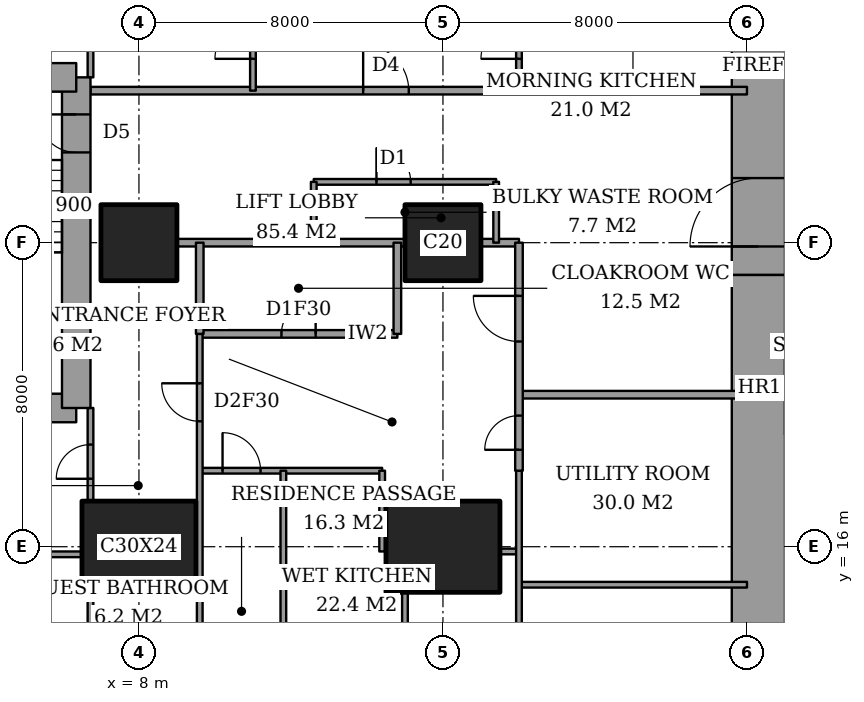
"""IFC4 building model, lengths in metres.
Left out: names, types, materials, properties, quantities, classifications, styles, units other than length and angle.
Written with IfcOpenShell. Run it as: python <this file> out.ifc"""

import sys

from ifc_helpers import new_model, si_unit, direction, frame, frame_2d, origin, origin_2d, place, context, subcontext, project, spatial, rectangle, extrude, element, fill, save


model = new_model("IFC4")
c1 = context("Model", 3, precision=1e-05, world=origin(), true_north=direction((0.0, 1.0)))
c2 = subcontext(c1, "Body", "Model", "MODEL_VIEW")
j1 = project(units=[si_unit("LENGTHUNIT", "METRE"), si_unit("PLANEANGLEUNIT", "RADIAN")], contexts=[c1])
p1 = place(None, origin())
s1 = spatial("IfcSite", under=j1, at=p1, CompositionType="ELEMENT")
p2 = place(p1, origin())
s2 = spatial("IfcBuilding", under=s1, at=p2, CompositionType="ELEMENT")
p3 = place(p2, frame((0.0, 0.0, 114.2)))
s3 = spatial("IfcBuildingStorey", under=s2, at=p3, CompositionType="ELEMENT", Elevation=114.2)
p4 = place(p3, frame((8.0, 16.0, 0.0), z_axis=(0.0, 0.0, 1.0), x_axis=(1.0, 0.0, 0.0)))
e1 = element("IfcColumn", 1, at=p4, inside=s3, PredefinedType="COLUMN", context=c2, shape_type="SweptSolid", body=[
    extrude(rectangle(XDim=3.0, YDim=2.4, at=origin_2d()), origin(), (0.0, 0.0, 1.0), 3.6),
])
p5 = place(p3, frame((8.0, 24.0, 0.0), z_axis=(0.0, 0.0, 1.0), x_axis=(1.0, 0.0, 0.0)))
e2 = element("IfcColumn", 2, at=p5, inside=s3, PredefinedType="COLUMN", context=c2, shape_type="SweptSolid", body=[
    extrude(rectangle(XDim=2.0, YDim=2.0, at=origin_2d()), origin(), (0.0, 0.0, 1.0), 3.6),
])
p6 = place(p3, frame((16.0, 16.0, 0.0), z_axis=(0.0, 0.0, 1.0), x_axis=(1.0, 0.0, 0.0)))
e3 = element("IfcColumn", 3, at=p6, inside=s3, PredefinedType="COLUMN", context=c2, shape_type="SweptSolid", body=[
    extrude(rectangle(XDim=3.0, YDim=2.4, at=origin_2d()), origin(), (0.0, 0.0, 1.0), 3.6),
])
p7 = place(p3, frame((16.0, 24.0, 0.0), z_axis=(0.0, 0.0, 1.0), x_axis=(1.0, 0.0, 0.0)))
e4 = element("IfcColumn", 4, at=p7, inside=s3, PredefinedType="COLUMN", context=c2, shape_type="SweptSolid", body=[
    extrude(rectangle(XDim=2.0, YDim=2.0, at=origin_2d()), origin(), (0.0, 0.0, 1.0), 3.6),
])
p8 = place(p3, frame((24.3, 13.0, 0.0), z_axis=(0.0, 0.0, 1.0), x_axis=(0.0, 1.0, 0.0)))
e5 = element("IfcWall", 5, at=p8, inside=s3, PredefinedType="SHEAR", context=c2, shape_type="SweptSolid", body=[
    extrude(rectangle(XDim=10.15, YDim=1.4, at=frame_2d((5.075, 0.0))), origin(), (0.0, 0.0, 1.0), 3.6),
])
p9 = place(p3, frame((24.3, 23.15, 0.0), z_axis=(0.0, 0.0, 1.0), x_axis=(0.0, 1.0, 0.0)))
e6 = element("IfcWall", 6, at=p9, inside=s3, PredefinedType="SHEAR", context=c2, shape_type="SweptSolid", body=[
    extrude(rectangle(XDim=11.85, YDim=1.4, at=frame_2d((5.925, 0.0))), origin(), (0.0, 0.0, 1.0), 3.6),
])
p10 = place(p9, frame((0.75, 0.0, 0.0)))
e7 = element("IfcOpeningElement", 7, at=p10, cuts=e6, PredefinedType="OPENING", context=c2, shape_type="SweptSolid", body=[
    extrude(rectangle(XDim=1.8, YDim=2.4, at=frame_2d((0.9, 1.2))), frame((0.0, 0.71, 0.0), z_axis=(0.0, -1.0, 0.0), x_axis=(1.0, 0.0, 0.0)), (0.0, 0.0, 1.0), 1.42),
])
p11 = place(p3, frame((1.9, 19.65, 0.0), z_axis=(0.0, 0.0, 1.0), x_axis=(1.0, 0.0, 0.0)))
e8 = element("IfcWall", 8, at=p11, inside=s3, PredefinedType="SHEAR", context=c2, shape_type="SweptSolid", body=[
    extrude(rectangle(XDim=4.45, YDim=0.75, at=frame_2d((2.225, 0.0))), origin(), (0.0, 0.0, 1.0), 3.6),
])
p12 = place(p3, frame((6.35, 19.65, 0.0), z_axis=(0.0, 0.0, 1.0), x_axis=(0.0, 1.0, 0.0)))
e9 = element("IfcWall", 9, at=p12, inside=s3, PredefinedType="SHEAR", context=c2, shape_type="SweptSolid", body=[
    extrude(rectangle(XDim=8.7, YDim=0.75, at=frame_2d((4.35, 0.0))), origin(), (0.0, 0.0, 1.0), 3.6),
])
p13 = place(p12, frame((6.725, 0.0, 0.0)))
e10 = element("IfcOpeningElement", 10, at=p13, cuts=e9, PredefinedType="OPENING", context=c2, shape_type="SweptSolid", body=[
    extrude(rectangle(XDim=1.0, YDim=2.1, at=frame_2d((0.5, 1.05))), frame((0.0, 0.385, 0.0), z_axis=(0.0, -1.0, 0.0), x_axis=(1.0, 0.0, 0.0)), (0.0, 0.0, 1.0), 0.77),
])
p14 = place(p3, frame((6.35, 28.35, 0.0), z_axis=(0.0, 0.0, 1.0), x_axis=(-1.0, 0.0, 0.0)))
e11 = element("IfcWall", 11, at=p14, inside=s3, PredefinedType="SHEAR", context=c2, shape_type="SweptSolid", body=[
    extrude(rectangle(XDim=4.45, YDim=0.75, at=frame_2d((2.225, 0.0))), origin(), (0.0, 0.0, 1.0), 3.6),
])
p15 = place(p3, frame((18.0, 15.0, 0.0), z_axis=(0.0, 0.0, 1.0), x_axis=(1.0, 0.0, 0.0)))
e12 = element("IfcWall", 12, at=p15, inside=s3, PredefinedType="PARTITIONING", context=c2, shape_type="SweptSolid", body=[
    extrude(rectangle(XDim=6.0, YDim=0.15, at=frame_2d((3.0, 0.0))), origin(), (0.0, 0.0, 1.0), 3.35),
])
p16 = place(p3, frame((1.35, 15.8, 0.0), z_axis=(0.0, 0.0, 1.0), x_axis=(1.0, 0.0, 0.0)))
e13 = element("IfcWall", 13, at=p16, inside=s3, PredefinedType="PARTITIONING", context=c2, shape_type="SweptSolid", body=[
    extrude(rectangle(XDim=5.15, YDim=0.15, at=frame_2d((2.575, 0.0))), origin(), (0.0, 0.0, 1.0), 3.35),
])
p17 = place(p3, frame((17.5, 15.875, 0.0), z_axis=(0.0, 0.0, 1.0), x_axis=(1.0, 0.0, 0.0)))
e14 = element("IfcWall", 14, at=p17, inside=s3, PredefinedType="PARTITIONING", context=c2, shape_type="SweptSolid", body=[
    extrude(rectangle(XDim=0.5, YDim=0.15, at=frame_2d((0.25, 0.0))), origin(), (0.0, 0.0, 1.0), 2.634),
])
p18 = place(p3, frame((9.6, 18.0, 0.0), z_axis=(0.0, 0.0, 1.0), x_axis=(1.0, 0.0, 0.0)))
e15 = element("IfcWall", 15, at=p18, inside=s3, PredefinedType="PARTITIONING", context=c2, shape_type="SweptSolid", body=[
    extrude(rectangle(XDim=4.8, YDim=0.15, at=frame_2d((2.4, 0.0))), origin(), (0.0, 0.0, 1.0), 3.35),
])
p19 = place(p18, frame((0.6, 0.0, 0.0)))
e16 = element("IfcOpeningElement", 16, at=p19, cuts=e15, PredefinedType="OPENING", context=c2, shape_type="SweptSolid", body=[
    extrude(rectangle(XDim=1.0, YDim=2.1, at=frame_2d((0.5, 1.05))), frame((0.0, 0.085, 0.0), z_axis=(0.0, -1.0, 0.0), x_axis=(1.0, 0.0, 0.0)), (0.0, 0.0, 1.0), 0.17),
])
p20 = place(p3, frame((18.0, 20.0, 0.0), z_axis=(0.0, 0.0, 1.0), x_axis=(1.0, 0.0, 0.0)))
e17 = element("IfcWall", 17, at=p20, inside=s3, PredefinedType="PARTITIONING", context=c2, shape_type="SweptSolid", body=[
    extrude(rectangle(XDim=6.0, YDim=0.2, at=frame_2d((3.0, 0.0))), origin(), (0.0, 0.0, 1.0), 3.35),
])
p21 = place(p3, frame((9.6, 21.6, 0.0), z_axis=(0.0, 0.0, 1.0), x_axis=(1.0, 0.0, 0.0)))
e18 = element("IfcWall", 18, at=p21, inside=s3, PredefinedType="PARTITIONING", context=c2, shape_type="SweptSolid", body=[
    extrude(rectangle(XDim=5.2, YDim=0.2, at=frame_2d((2.6, 0.0))), origin(), (0.0, 0.0, 1.0), 3.35),
])
p22 = place(p21, frame((2.15, 0.0, 0.0)))
e19 = element("IfcOpeningElement", 19, at=p22, cuts=e18, PredefinedType="OPENING", context=c2, shape_type="SweptSolid", body=[
    extrude(rectangle(XDim=0.9, YDim=2.1, at=frame_2d((0.45, 1.05))), frame((0.0, 0.11, 0.0), z_axis=(0.0, -1.0, 0.0), x_axis=(1.0, 0.0, 0.0)), (0.0, 0.0, 1.0), 0.22),
])
p23 = place(p3, frame((9.0, 24.0, 0.0), z_axis=(0.0, 0.0, 1.0), x_axis=(1.0, 0.0, 0.0)))
e20 = element("IfcWall", 20, at=p23, inside=s3, PredefinedType="PARTITIONING", context=c2, shape_type="SweptSolid", body=[
    extrude(rectangle(XDim=6.0, YDim=0.2, at=frame_2d((3.0, 0.0))), origin(), (0.0, 0.0, 1.0), 3.35),
])
p24 = place(p3, frame((17.0, 24.0, 0.0), z_axis=(0.0, 0.0, 1.0), x_axis=(1.0, 0.0, 0.0)))
e21 = element("IfcWall", 21, at=p24, inside=s3, PredefinedType="PARTITIONING", context=c2, shape_type="SweptSolid", body=[
    extrude(rectangle(XDim=1.0, YDim=0.2, at=frame_2d((0.5, 0.0))), origin(), (0.0, 0.0, 1.0), 3.35),
])
p25 = place(p3, frame((12.6, 25.6, 0.0), z_axis=(0.0, 0.0, 1.0), x_axis=(1.0, 0.0, 0.0)))
e22 = element("IfcWall", 22, at=p25, inside=s3, PredefinedType="PARTITIONING", context=c2, shape_type="SweptSolid", body=[
    extrude(rectangle(XDim=4.8, YDim=0.15, at=frame_2d((2.4, 0.0))), origin(), (0.0, 0.0, 1.0), 3.35),
])
p26 = place(p25, frame((1.65, 0.0, 0.0)))
e23 = element("IfcOpeningElement", 23, at=p26, cuts=e22, PredefinedType="OPENING", context=c2, shape_type="SweptSolid", body=[
    extrude(rectangle(XDim=0.9, YDim=2.1, at=frame_2d((0.45, 1.05))), frame((0.0, 0.085, 0.0), z_axis=(0.0, -1.0, 0.0), x_axis=(1.0, 0.0, 0.0)), (0.0, 0.0, 1.0), 0.17),
])
p27 = place(p3, frame((6.725, 28.0, 0.0), z_axis=(0.0, 0.0, 1.0), x_axis=(1.0, 0.0, 0.0)))
e24 = element("IfcWall", 24, at=p27, inside=s3, PredefinedType="PARTITIONING", context=c2, shape_type="SweptSolid", body=[
    extrude(rectangle(XDim=17.275, YDim=0.2, at=frame_2d((8.637, 0.0))), origin(), (0.0, 0.0, 1.0), 3.35),
])
p28 = place(p27, frame((7.175, 0.0, 0.0)))
e25 = element("IfcOpeningElement", 25, at=p28, cuts=e24, PredefinedType="OPENING", context=c2, shape_type="SweptSolid", body=[
    extrude(rectangle(XDim=1.2, YDim=2.4, at=frame_2d((0.6, 1.2))), frame((0.0, 0.11, 0.0), z_axis=(0.0, -1.0, 0.0), x_axis=(1.0, 0.0, 0.0)), (0.0, 0.0, 1.0), 0.22),
])
p29 = place(p3, frame((6.725, 10.6, 0.0), z_axis=(0.0, 0.0, 1.0), x_axis=(0.0, 1.0, 0.0)))
e26 = element("IfcWall", 26, at=p29, inside=s3, PredefinedType="PARTITIONING", context=c2, shape_type="SweptSolid", body=[
    extrude(rectangle(XDim=4.2, YDim=0.15, at=frame_2d((2.1, 0.0))), origin(), (0.0, 0.0, 1.0), 3.35),
])
p30 = place(p3, frame((6.725, 17.2, 0.0), z_axis=(0.0, 0.0, 1.0), x_axis=(0.0, 1.0, 0.0)))
e27 = element("IfcWall", 27, at=p30, inside=s3, PredefinedType="PARTITIONING", context=c2, shape_type="SweptSolid", body=[
    extrude(rectangle(XDim=2.45, YDim=0.15, at=frame_2d((1.225, 0.0))), origin(), (0.0, 0.0, 1.0), 3.35),
])
p31 = place(p30, frame((0.587, 0.0, 0.0)))
e28 = element("IfcOpeningElement", 28, at=p31, cuts=e27, PredefinedType="OPENING", context=c2, shape_type="SweptSolid", body=[
    extrude(rectangle(XDim=0.9, YDim=2.1, at=frame_2d((0.45, 1.05))), frame((0.0, 0.085, 0.0), z_axis=(0.0, -1.0, 0.0), x_axis=(1.0, 0.0, 0.0)), (0.0, 0.0, 1.0), 0.17),
])
p32 = place(p3, frame((6.725, 28.35, 0.0), z_axis=(0.0, 0.0, 1.0), x_axis=(0.0, 1.0, 0.0)))
e29 = element("IfcWall", 29, at=p32, inside=s3, PredefinedType="PARTITIONING", context=c2, shape_type="SweptSolid", body=[
    extrude(rectangle(XDim=2.45, YDim=0.15, at=frame_2d((1.225, 0.0))), origin(), (0.0, 0.0, 1.0), 3.35),
])
p33 = place(p32, frame((0.913, 0.0, 0.0)))
e30 = element("IfcOpeningElement", 30, at=p33, cuts=e29, PredefinedType="OPENING", context=c2, shape_type="SweptSolid", body=[
    extrude(rectangle(XDim=1.0, YDim=2.1, at=frame_2d((0.5, 1.05))), frame((0.0, 0.085, 0.0), z_axis=(0.0, -1.0, 0.0), x_axis=(1.0, 0.0, 0.0)), (0.0, 0.0, 1.0), 0.17),
])
p34 = place(p3, frame((9.6, 21.6, 0.0), z_axis=(0.0, 0.0, 1.0), x_axis=(0.0, 1.0, 0.0)))
e31 = element("IfcWall", 31, at=p34, inside=s3, PredefinedType="PARTITIONING", context=c2, shape_type="SweptSolid", body=[
    extrude(rectangle(XDim=2.4, YDim=0.2, at=frame_2d((1.2, 0.0))), origin(), (0.0, 0.0, 1.0), 3.35),
])
p35 = place(p3, frame((9.6, 10.6, 0.0), z_axis=(0.0, 0.0, 1.0), x_axis=(0.0, 1.0, 0.0)))
e32 = element("IfcWall", 32, at=p35, inside=s3, PredefinedType="PARTITIONING", context=c2, shape_type="SweptSolid", body=[
    extrude(rectangle(XDim=11.0, YDim=0.15, at=frame_2d((5.5, 0.0))), origin(), (0.0, 0.0, 1.0), 3.35),
])
p36 = place(p35, frame((8.7, 0.0, 0.0)))
e33 = element("IfcOpeningElement", 33, at=p36, cuts=e32, PredefinedType="OPENING", context=c2, shape_type="SweptSolid", body=[
    extrude(rectangle(XDim=1.0, YDim=2.1, at=frame_2d((0.5, 1.05))), frame((0.0, 0.085, 0.0), z_axis=(0.0, -1.0, 0.0), x_axis=(1.0, 0.0, 0.0)), (0.0, 0.0, 1.0), 0.17),
])
p37 = place(p3, frame((11.0, 28.0, 0.0), z_axis=(0.0, 0.0, 1.0), x_axis=(0.0, 1.0, 0.0)))
e34 = element("IfcWall", 34, at=p37, inside=s3, PredefinedType="PARTITIONING", context=c2, shape_type="SweptSolid", body=[
    extrude(rectangle(XDim=9.2, YDim=0.15, at=frame_2d((4.6, 0.0))), origin(), (0.0, 0.0, 1.0), 3.35),
])
p38 = place(p37, frame((0.837, 0.0, 0.0)))
e35 = element("IfcOpeningElement", 35, at=p38, cuts=e34, PredefinedType="OPENING", context=c2, shape_type="SweptSolid", body=[
    extrude(rectangle(XDim=1.0, YDim=2.1, at=frame_2d((0.5, 1.05))), frame((0.0, 0.085, 0.0), z_axis=(0.0, -1.0, 0.0), x_axis=(1.0, 0.0, 0.0)), (0.0, 0.0, 1.0), 0.17),
])
p39 = place(p3, frame((11.8, 10.6, 0.0), z_axis=(0.0, 0.0, 1.0), x_axis=(0.0, 1.0, 0.0)))
e36 = element("IfcWall", 36, at=p39, inside=s3, PredefinedType="PARTITIONING", context=c2, shape_type="SweptSolid", body=[
    extrude(rectangle(XDim=7.4, YDim=0.15, at=frame_2d((3.7, 0.0))), origin(), (0.0, 0.0, 1.0), 3.35),
])
p40 = place(p3, frame((12.6, 24.0, 0.0), z_axis=(0.0, 0.0, 1.0), x_axis=(0.0, 1.0, 0.0)))
e37 = element("IfcWall", 37, at=p40, inside=s3, PredefinedType="PARTITIONING", context=c2, shape_type="SweptSolid", body=[
    extrude(rectangle(XDim=1.6, YDim=0.15, at=frame_2d((0.8, 0.0))), origin(), (0.0, 0.0, 1.0), 3.35),
])
p41 = place(p3, frame((14.4, 15.875, 0.0), z_axis=(0.0, 0.0, 1.0), x_axis=(0.0, 1.0, 0.0)))
e38 = element("IfcWall", 38, at=p41, inside=s3, PredefinedType="PARTITIONING", context=c2, shape_type="SweptSolid", body=[
    extrude(rectangle(XDim=2.125, YDim=0.15, at=frame_2d((1.062, 0.0))), origin(), (0.0, 0.0, 1.0), 3.35),
])
p42 = place(p3, frame((14.8, 21.6, 0.0), z_axis=(0.0, 0.0, 1.0), x_axis=(0.0, 1.0, 0.0)))
e39 = element("IfcWall", 39, at=p42, inside=s3, PredefinedType="PARTITIONING", context=c2, shape_type="SweptSolid", body=[
    extrude(rectangle(XDim=2.4, YDim=0.2, at=frame_2d((1.2, 0.0))), origin(), (0.0, 0.0, 1.0), 3.35),
])
p43 = place(p3, frame((15.0, 10.6, 0.0), z_axis=(0.0, 0.0, 1.0), x_axis=(0.0, 1.0, 0.0)))
e40 = element("IfcWall", 40, at=p43, inside=s3, PredefinedType="PARTITIONING", context=c2, shape_type="SweptSolid", body=[
    extrude(rectangle(XDim=4.2, YDim=0.15, at=frame_2d((2.1, 0.0))), origin(), (0.0, 0.0, 1.0), 3.35),
])
p44 = place(p3, frame((17.4, 24.0, 0.0), z_axis=(0.0, 0.0, 1.0), x_axis=(0.0, 1.0, 0.0)))
e41 = element("IfcWall", 41, at=p44, inside=s3, PredefinedType="PARTITIONING", context=c2, shape_type="SweptSolid", body=[
    extrude(rectangle(XDim=1.6, YDim=0.15, at=frame_2d((0.8, 0.0))), origin(), (0.0, 0.0, 1.0), 3.35),
])
p45 = place(p3, frame((18.0, 18.0, 0.0), z_axis=(0.0, 0.0, 1.0), x_axis=(0.0, 1.0, 0.0)))
e42 = element("IfcWall", 42, at=p45, inside=s3, PredefinedType="PARTITIONING", context=c2, shape_type="SweptSolid", body=[
    extrude(rectangle(XDim=6.0, YDim=0.2, at=frame_2d((3.0, 0.0))), origin(), (0.0, 0.0, 1.0), 3.35),
])
p46 = place(p45, frame((3.4, 0.0, 0.0)))
e43 = element("IfcOpeningElement", 43, at=p46, cuts=e42, PredefinedType="OPENING", context=c2, shape_type="SweptSolid", body=[
    extrude(rectangle(XDim=1.2, YDim=2.4, at=frame_2d((0.6, 1.2))), frame((0.0, 0.11, 0.0), z_axis=(0.0, -1.0, 0.0), x_axis=(1.0, 0.0, 0.0)), (0.0, 0.0, 1.0), 0.22),
])
p47 = place(p45, frame((0.55, 0.0, 0.0)))
e44 = element("IfcOpeningElement", 44, at=p47, cuts=e42, PredefinedType="OPENING", context=c2, shape_type="SweptSolid", body=[
    extrude(rectangle(XDim=0.9, YDim=2.1, at=frame_2d((0.45, 1.05))), frame((0.0, 0.11, 0.0), z_axis=(0.0, -1.0, 0.0), x_axis=(1.0, 0.0, 0.0)), (0.0, 0.0, 1.0), 0.22),
])
p48 = place(p3, frame((18.0, 10.6, 0.0), z_axis=(0.0, 0.0, 1.0), x_axis=(0.0, 1.0, 0.0)))
e45 = element("IfcWall", 45, at=p48, inside=s3, PredefinedType="PARTITIONING", context=c2, shape_type="SweptSolid", body=[
    extrude(rectangle(XDim=7.4, YDim=0.15, at=frame_2d((3.7, 0.0))), origin(), (0.0, 0.0, 1.0), 3.35),
])
p49 = place(p3, frame((18.0, 28.0, 0.0), z_axis=(0.0, 0.0, 1.0), x_axis=(0.0, 1.0, 0.0)))
e46 = element("IfcWall", 46, at=p49, inside=s3, PredefinedType="PARTITIONING", context=c2, shape_type="SweptSolid", body=[
    extrude(rectangle(XDim=9.2, YDim=0.15, at=frame_2d((4.6, 0.0))), origin(), (0.0, 0.0, 1.0), 3.35),
])
p50 = place(p49, frame((0.837, 0.0, 0.0)))
e47 = element("IfcOpeningElement", 47, at=p50, cuts=e46, PredefinedType="OPENING", context=c2, shape_type="SweptSolid", body=[
    extrude(rectangle(XDim=1.0, YDim=2.1, at=frame_2d((0.5, 1.05))), frame((0.0, 0.085, 0.0), z_axis=(0.0, -1.0, 0.0), x_axis=(1.0, 0.0, 0.0)), (0.0, 0.0, 1.0), 0.17),
])
p51 = place(p31, origin())
e48 = element("IfcDoor", 48, at=p51, inside=s3, OperationType="SINGLE_SWING_RIGHT", PredefinedType="DOOR", context=c2, shape_type="SweptSolid", body=[
    extrude(rectangle(XDim=0.9, YDim=2.1, at=frame_2d((0.45, 1.05))), frame((0.0, 0.025, 0.0), z_axis=(0.0, -1.0, 0.0), x_axis=(1.0, 0.0, 0.0)), (0.0, 0.0, 1.0), 0.05),
])
fill(e28, e48)
p52 = place(p36, origin())
e49 = element("IfcDoor", 49, at=p52, inside=s3, OperationType="SINGLE_SWING_LEFT", PredefinedType="DOOR", context=c2, shape_type="SweptSolid", body=[
    extrude(rectangle(XDim=1.0, YDim=2.1, at=frame_2d((0.5, 1.05))), frame((0.0, 0.025, 0.0), z_axis=(0.0, -1.0, 0.0), x_axis=(1.0, 0.0, 0.0)), (0.0, 0.0, 1.0), 0.05),
])
fill(e33, e49)
p53 = place(p22, origin())
e50 = element("IfcDoor", 50, at=p53, inside=s3, OperationType="SINGLE_SWING_LEFT", PredefinedType="DOOR", context=c2, shape_type="SweptSolid", body=[
    extrude(rectangle(XDim=0.9, YDim=2.1, at=frame_2d((0.45, 1.05))), frame((0.0, 0.025, 0.0), z_axis=(0.0, -1.0, 0.0), x_axis=(1.0, 0.0, 0.0)), (0.0, 0.0, 1.0), 0.05),
])
fill(e19, e50)
p54 = place(p46, origin())
e51 = element("IfcDoor", 51, at=p54, inside=s3, OperationType="SINGLE_SWING_LEFT", PredefinedType="DOOR", context=c2, shape_type="SweptSolid", body=[
    extrude(rectangle(XDim=1.2, YDim=2.4, at=frame_2d((0.6, 1.2))), frame((0.0, 0.025, 0.0), z_axis=(0.0, -1.0, 0.0), x_axis=(1.0, 0.0, 0.0)), (0.0, 0.0, 1.0), 0.05),
])
fill(e43, e51)
p55 = place(p19, origin())
e52 = element("IfcDoor", 52, at=p55, inside=s3, OperationType="SINGLE_SWING_RIGHT", PredefinedType="DOOR", context=c2, shape_type="SweptSolid", body=[
    extrude(rectangle(XDim=1.0, YDim=2.1, at=frame_2d((0.5, 1.05))), frame((0.0, 0.025, 0.0), z_axis=(0.0, -1.0, 0.0), x_axis=(1.0, 0.0, 0.0)), (0.0, 0.0, 1.0), 0.05),
])
fill(e16, e52)
p56 = place(p47, origin())
e53 = element("IfcDoor", 53, at=p56, inside=s3, OperationType="SINGLE_SWING_RIGHT", PredefinedType="DOOR", context=c2, shape_type="SweptSolid", body=[
    extrude(rectangle(XDim=0.9, YDim=2.1, at=frame_2d((0.45, 1.05))), frame((0.0, 0.025, 0.0), z_axis=(0.0, -1.0, 0.0), x_axis=(1.0, 0.0, 0.0)), (0.0, 0.0, 1.0), 0.05),
])
fill(e44, e53)
p57 = place(p38, origin())
e54 = element("IfcDoor", 54, at=p57, inside=s3, OperationType="SINGLE_SWING_RIGHT", PredefinedType="DOOR", context=c2, shape_type="SweptSolid", body=[
    extrude(rectangle(XDim=1.0, YDim=2.1, at=frame_2d((0.5, 1.05))), frame((0.0, 0.025, 0.0), z_axis=(0.0, -1.0, 0.0), x_axis=(1.0, 0.0, 0.0)), (0.0, 0.0, 1.0), 0.05),
])
fill(e35, e54)
p58 = place(p28, origin())
e55 = element("IfcDoor", 55, at=p58, inside=s3, OperationType="SINGLE_SWING_RIGHT", PredefinedType="DOOR", context=c2, shape_type="SweptSolid", body=[
    extrude(rectangle(XDim=1.2, YDim=2.4, at=frame_2d((0.6, 1.2))), frame((0.0, 0.025, 0.0), z_axis=(0.0, -1.0, 0.0), x_axis=(1.0, 0.0, 0.0)), (0.0, 0.0, 1.0), 0.05),
])
fill(e25, e55)
p59 = place(p50, origin())
e56 = element("IfcDoor", 56, at=p59, inside=s3, OperationType="SINGLE_SWING_RIGHT", PredefinedType="DOOR", context=c2, shape_type="SweptSolid", body=[
    extrude(rectangle(XDim=1.0, YDim=2.1, at=frame_2d((0.5, 1.05))), frame((0.0, 0.025, 0.0), z_axis=(0.0, -1.0, 0.0), x_axis=(1.0, 0.0, 0.0)), (0.0, 0.0, 1.0), 0.05),
])
fill(e47, e56)
p60 = place(p26, origin())
e57 = element("IfcDoor", 57, at=p60, inside=s3, OperationType="SINGLE_SWING_RIGHT", PredefinedType="DOOR", context=c2, shape_type="SweptSolid", body=[
    extrude(rectangle(XDim=0.9, YDim=2.1, at=frame_2d((0.45, 1.05))), frame((0.0, 0.025, 0.0), z_axis=(0.0, -1.0, 0.0), x_axis=(1.0, 0.0, 0.0)), (0.0, 0.0, 1.0), 0.05),
])
fill(e23, e57)
p61 = place(p10, origin())
e58 = element("IfcDoor", 58, at=p61, inside=s3, OperationType="DOUBLE_DOOR_DOUBLE_SWING", PredefinedType="DOOR", context=c2, shape_type="SweptSolid", body=[
    extrude(rectangle(XDim=1.8, YDim=2.4, at=frame_2d((0.9, 1.2))), frame((0.0, 0.025, 0.0), z_axis=(0.0, -1.0, 0.0), x_axis=(1.0, 0.0, 0.0)), (0.0, 0.0, 1.0), 0.05),
])
fill(e7, e58)
p62 = place(p13, origin())
e59 = element("IfcDoor", 59, at=p62, inside=s3, OperationType="SINGLE_SWING_LEFT", PredefinedType="DOOR", context=c2, shape_type="SweptSolid", body=[
    extrude(rectangle(XDim=1.0, YDim=2.1, at=frame_2d((0.5, 1.05))), frame((0.0, 0.025, 0.0), z_axis=(0.0, -1.0, 0.0), x_axis=(1.0, 0.0, 0.0)), (0.0, 0.0, 1.0), 0.05),
])
fill(e10, e59)
save(model, sys.argv[1])
